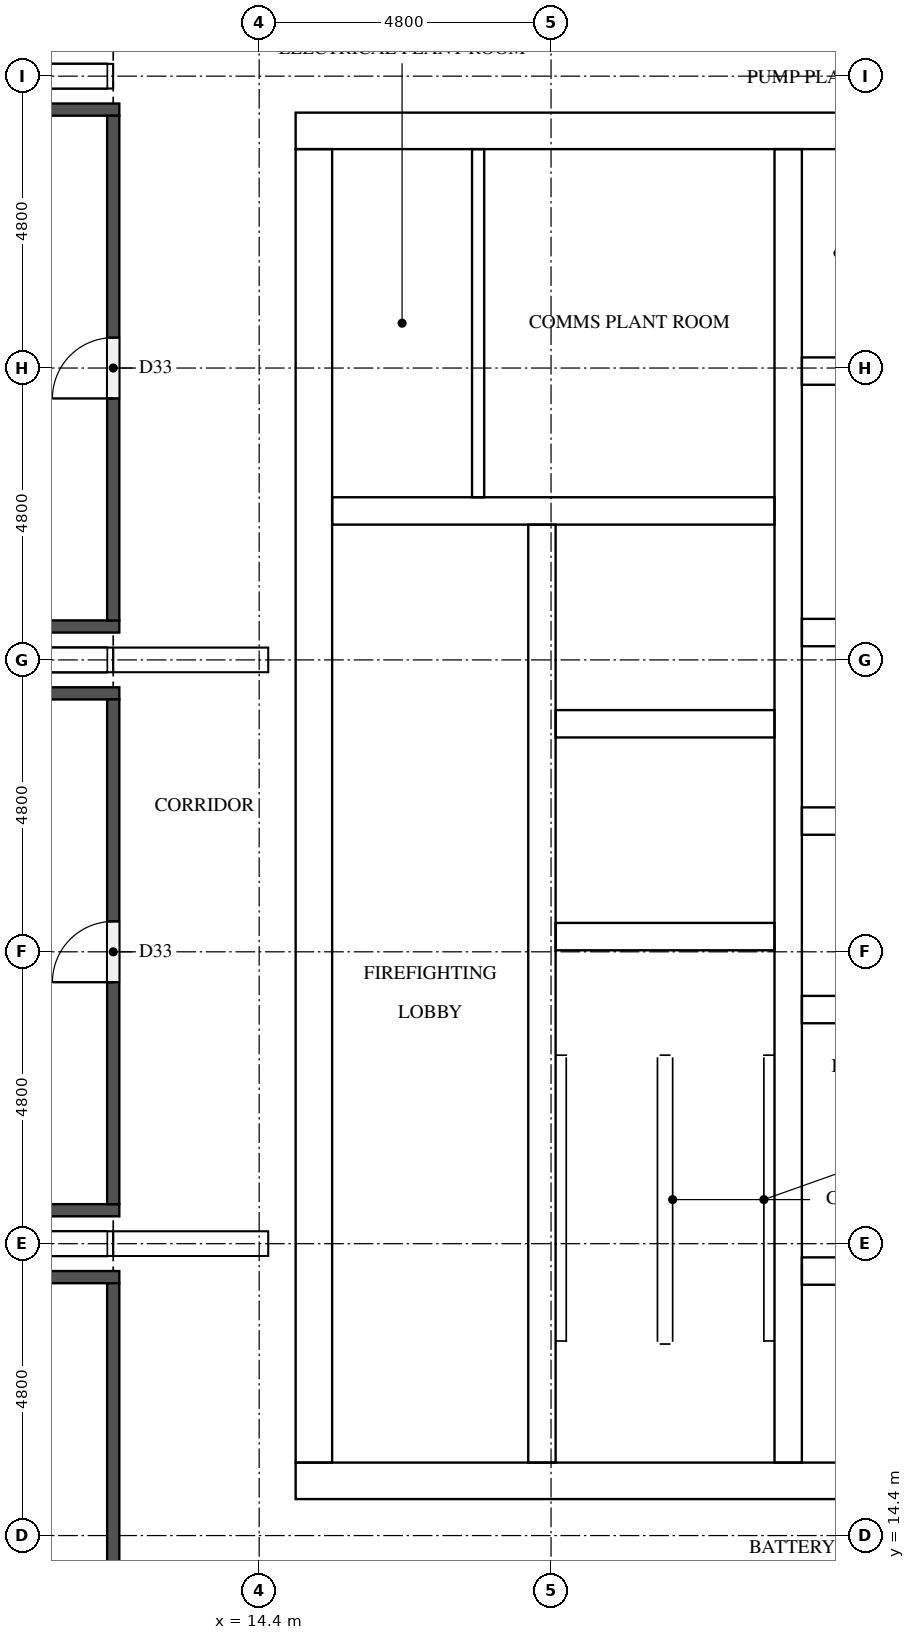
"""IFC4 building model, lengths in metres.
Left out: names, types, materials, properties, quantities, classifications, styles, units other than length and angle.
Written with IfcOpenShell. Run it as: python <this file> out.ifc"""

import sys

from ifc_helpers import new_model, si_unit, direction, frame, frame_2d, origin, place, context, subcontext, project, spatial, rectangle, extrude, element, fill, save


model = new_model("IFC4")
c1 = context("Model", 3, precision=1e-05, world=origin(), true_north=direction((0.0, 1.0)))
c2 = subcontext(c1, "Body", "Model", "MODEL_VIEW")
j1 = project(units=[si_unit("LENGTHUNIT", "METRE"), si_unit("PLANEANGLEUNIT", "RADIAN")], contexts=[c1])
p1 = place(None, origin())
s1 = spatial("IfcSite", under=j1, at=p1, CompositionType="ELEMENT")
p2 = place(p1, origin())
s2 = spatial("IfcBuilding", under=s1, at=p2, CompositionType="ELEMENT")
p3 = place(p2, frame((0.0, 0.0, 233.3)))
s3 = spatial("IfcBuildingStorey", under=s2, at=p3, CompositionType="ELEMENT", Elevation=233.3)
p4 = place(p3, frame((15.0, 15.3, 0.0), z_axis=(0.0, 0.0, 1.0), x_axis=(1.0, 0.0, 0.0)))
e1 = element("IfcWall", 1, at=p4, inside=s3, PredefinedType="SHEAR", context=c2, shape_type="SweptSolid", body=[
    extrude(rectangle(XDim=32.4, YDim=0.6, at=frame_2d((16.2, 0.0))), origin(), (0.0, 0.0, 1.0), 5.1),
])
p5 = place(p4, frame((15.3, 0.0, 0.0)))
e2 = element("IfcOpeningElement", 2, at=p5, cuts=e1, PredefinedType="OPENING", context=c2, shape_type="SweptSolid", body=[
    extrude(rectangle(XDim=1.8, YDim=2.1, at=frame_2d((0.9, 1.05))), frame((0.0, 0.31, 0.0), z_axis=(0.0, -1.0, 0.0), x_axis=(1.0, 0.0, 0.0)), (0.0, 0.0, 1.0), 0.62),
])
p6 = place(p3, frame((15.0, 37.5, 0.0), z_axis=(0.0, 0.0, 1.0), x_axis=(1.0, 0.0, 0.0)))
e3 = element("IfcWall", 3, at=p6, inside=s3, PredefinedType="SHEAR", context=c2, shape_type="SweptSolid", body=[
    extrude(rectangle(XDim=32.4, YDim=0.6, at=frame_2d((16.2, 0.0))), origin(), (0.0, 0.0, 1.0), 5.1),
])
p7 = place(p6, frame((15.3, 0.0, 0.0)))
e4 = element("IfcOpeningElement", 4, at=p7, cuts=e3, PredefinedType="OPENING", context=c2, shape_type="SweptSolid", body=[
    extrude(rectangle(XDim=1.8, YDim=2.1, at=frame_2d((0.9, 1.05))), frame((0.0, 0.31, 0.0), z_axis=(0.0, -1.0, 0.0), x_axis=(1.0, 0.0, 0.0)), (0.0, 0.0, 1.0), 0.62),
])
p8 = place(p6, frame((1.25, 0.0, 0.0)))
e5 = element("IfcOpeningElement", 5, at=p8, cuts=e3, PredefinedType="OPENING", context=c2, shape_type="SweptSolid", body=[
    extrude(rectangle(XDim=1.0, YDim=2.1, at=frame_2d((0.5, 1.05))), frame((0.0, 0.31, 0.0), z_axis=(0.0, -1.0, 0.0), x_axis=(1.0, 0.0, 0.0)), (0.0, 0.0, 1.0), 0.62),
])
p9 = place(p6, frame((4.988, 0.0, 0.0)))
e6 = element("IfcOpeningElement", 6, at=p9, cuts=e3, PredefinedType="OPENING", context=c2, shape_type="SweptSolid", body=[
    extrude(rectangle(XDim=1.0, YDim=2.1, at=frame_2d((0.5, 1.05))), frame((0.0, 0.31, 0.0), z_axis=(0.0, -1.0, 0.0), x_axis=(1.0, 0.0, 0.0)), (0.0, 0.0, 1.0), 0.62),
])
p10 = place(p3, frame((15.3, 15.6, 0.0), z_axis=(0.0, 0.0, 1.0), x_axis=(0.0, 1.0, 0.0)))
e7 = element("IfcWall", 7, at=p10, inside=s3, PredefinedType="SHEAR", context=c2, shape_type="SweptSolid", body=[
    extrude(rectangle(XDim=21.6, YDim=0.6, at=frame_2d((10.8, 0.0))), origin(), (0.0, 0.0, 1.0), 5.1),
])
p11 = place(p10, frame((5.16, 0.0, 0.0)))
e8 = element("IfcOpeningElement", 8, at=p11, cuts=e7, PredefinedType="OPENING", context=c2, shape_type="SweptSolid", body=[
    extrude(rectangle(XDim=1.2, YDim=2.1, at=frame_2d((0.6, 1.05))), frame((0.0, 0.31, 0.0), z_axis=(0.0, -1.0, 0.0), x_axis=(1.0, 0.0, 0.0)), (0.0, 0.0, 1.0), 0.62),
])
p12 = place(p3, frame((19.05, 15.6, 0.0), z_axis=(0.0, 0.0, 1.0), x_axis=(0.0, 1.0, 0.0)))
e9 = element("IfcWall", 9, at=p12, inside=s3, PredefinedType="SHEAR", context=c2, shape_type="SweptSolid", body=[
    extrude(rectangle(XDim=15.425, YDim=0.45, at=frame_2d((7.712, 0.0))), origin(), (0.0, 0.0, 1.0), 5.1),
])
p13 = place(p12, frame((9.85, 0.0, 0.0)))
e10 = element("IfcOpeningElement", 10, at=p13, cuts=e9, PredefinedType="OPENING", context=c2, shape_type="SweptSolid", body=[
    extrude(rectangle(XDim=1.1, YDim=2.1, at=frame_2d((0.55, 1.05))), frame((0.0, 0.235, 0.0), z_axis=(0.0, -1.0, 0.0), x_axis=(1.0, 0.0, 0.0)), (0.0, 0.0, 1.0), 0.47),
])
p14 = place(p12, frame((13.35, 0.0, 0.0)))
e11 = element("IfcOpeningElement", 11, at=p14, cuts=e9, PredefinedType="OPENING", context=c2, shape_type="SweptSolid", body=[
    extrude(rectangle(XDim=1.1, YDim=2.1, at=frame_2d((0.55, 1.05))), frame((0.0, 0.235, 0.0), z_axis=(0.0, -1.0, 0.0), x_axis=(1.0, 0.0, 0.0)), (0.0, 0.0, 1.0), 0.47),
])
p15 = place(p12, frame((0.6, 0.0, 0.0)))
e12 = element("IfcOpeningElement", 12, at=p15, cuts=e9, PredefinedType="OPENING", context=c2, shape_type="SweptSolid", body=[
    extrude(rectangle(XDim=1.2, YDim=2.1, at=frame_2d((0.6, 1.05))), frame((0.0, 0.235, 0.0), z_axis=(0.0, -1.0, 0.0), x_axis=(1.0, 0.0, 0.0)), (0.0, 0.0, 1.0), 0.47),
])
p16 = place(p3, frame((23.1, 15.6, 0.0), z_axis=(0.0, 0.0, 1.0), x_axis=(0.0, 1.0, 0.0)))
e13 = element("IfcWall", 13, at=p16, inside=s3, PredefinedType="SHEAR", context=c2, shape_type="SweptSolid", body=[
    extrude(rectangle(XDim=21.6, YDim=0.45, at=frame_2d((10.8, 0.0))), origin(), (0.0, 0.0, 1.0), 5.1),
])
for number, where, z_axis, x_axis in (
    (14, (19.275, 24.25, 0.0), (0.0, 0.0, 1.0), (1.0, 0.0, 0.0)),
    (15, (19.275, 27.75, 0.0), (0.0, 0.0, 1.0), (1.0, 0.0, 0.0)),
):
    element("IfcWall", number, at=place(p3, frame(where, z_axis=z_axis, x_axis=x_axis)), inside=s3, PredefinedType="SHEAR", context=c2, shape_type="SweptSolid", body=[
        extrude(rectangle(XDim=3.6, YDim=0.45, at=frame_2d((1.8, 0.0))), origin(), (0.0, 0.0, 1.0), 5.1),
    ])
p17 = place(p3, frame((15.6, 31.25, 0.0), z_axis=(0.0, 0.0, 1.0), x_axis=(1.0, 0.0, 0.0)))
e16 = element("IfcWall", 16, at=p17, inside=s3, PredefinedType="SHEAR", context=c2, shape_type="SweptSolid", body=[
    extrude(rectangle(XDim=7.275, YDim=0.45, at=frame_2d((3.637, 0.0))), origin(), (0.0, 0.0, 1.0), 5.1),
])
p18 = place(p3, frame((23.325, 18.75, 0.0), z_axis=(0.0, 0.0, 1.0), x_axis=(1.0, 0.0, 0.0)))
e17 = element("IfcWall", 17, at=p18, inside=s3, PredefinedType="SHEAR", context=c2, shape_type="SweptSolid", body=[
    extrude(rectangle(XDim=5.6, YDim=0.45, at=frame_2d((2.8, 0.0))), origin(), (0.0, 0.0, 1.0), 5.1),
])
p19 = place(p18, frame((0.403, 0.0, 0.0)))
e18 = element("IfcOpeningElement", 18, at=p19, cuts=e17, PredefinedType="OPENING", context=c2, shape_type="SweptSolid", body=[
    extrude(rectangle(XDim=1.0, YDim=2.1, at=frame_2d((0.5, 1.05))), frame((0.0, 0.235, 0.0), z_axis=(0.0, -1.0, 0.0), x_axis=(1.0, 0.0, 0.0)), (0.0, 0.0, 1.0), 0.47),
])
p20 = place(p18, frame((3.078, 0.0, 0.0)))
e19 = element("IfcOpeningElement", 19, at=p20, cuts=e17, PredefinedType="OPENING", context=c2, shape_type="SweptSolid", body=[
    extrude(rectangle(XDim=1.0, YDim=2.1, at=frame_2d((0.5, 1.05))), frame((0.0, 0.235, 0.0), z_axis=(0.0, -1.0, 0.0), x_axis=(1.0, 0.0, 0.0)), (0.0, 0.0, 1.0), 0.47),
])
p21 = place(p3, frame((23.325, 23.05, 0.0), z_axis=(0.0, 0.0, 1.0), x_axis=(1.0, 0.0, 0.0)))
e20 = element("IfcWall", 20, at=p21, inside=s3, PredefinedType="SHEAR", context=c2, shape_type="SweptSolid", body=[
    extrude(rectangle(XDim=15.75, YDim=0.45, at=frame_2d((7.875, 0.0))), origin(), (0.0, 0.0, 1.0), 5.1),
])
p22 = place(p21, frame((0.32, 0.0, 0.0)))
e21 = element("IfcOpeningElement", 21, at=p22, cuts=e20, PredefinedType="OPENING", context=c2, shape_type="SweptSolid", body=[
    extrude(rectangle(XDim=1.0, YDim=2.1, at=frame_2d((0.5, 1.05))), frame((0.0, 0.235, 0.0), z_axis=(0.0, -1.0, 0.0), x_axis=(1.0, 0.0, 0.0)), (0.0, 0.0, 1.0), 0.47),
])
p23 = place(p21, frame((2.978, 0.0, 0.0)))
e22 = element("IfcOpeningElement", 22, at=p23, cuts=e20, PredefinedType="OPENING", context=c2, shape_type="SweptSolid", body=[
    extrude(rectangle(XDim=1.0, YDim=2.1, at=frame_2d((0.5, 1.05))), frame((0.0, 0.235, 0.0), z_axis=(0.0, -1.0, 0.0), x_axis=(1.0, 0.0, 0.0)), (0.0, 0.0, 1.0), 0.47),
])
p24 = place(p21, frame((10.953, 0.0, 0.0)))
e23 = element("IfcOpeningElement", 23, at=p24, cuts=e20, PredefinedType="OPENING", context=c2, shape_type="SweptSolid", body=[
    extrude(rectangle(XDim=1.0, YDim=2.1, at=frame_2d((0.5, 1.05))), frame((0.0, 0.235, 0.0), z_axis=(0.0, -1.0, 0.0), x_axis=(1.0, 0.0, 0.0)), (0.0, 0.0, 1.0), 0.47),
])
p25 = place(p21, frame((13.612, 0.0, 0.0)))
e24 = element("IfcOpeningElement", 24, at=p25, cuts=e20, PredefinedType="OPENING", context=c2, shape_type="SweptSolid", body=[
    extrude(rectangle(XDim=1.0, YDim=2.1, at=frame_2d((0.5, 1.05))), frame((0.0, 0.235, 0.0), z_axis=(0.0, -1.0, 0.0), x_axis=(1.0, 0.0, 0.0)), (0.0, 0.0, 1.0), 0.47),
])
p26 = place(p3, frame((23.325, 26.15, 0.0), z_axis=(0.0, 0.0, 1.0), x_axis=(1.0, 0.0, 0.0)))
e25 = element("IfcWall", 25, at=p26, inside=s3, PredefinedType="SHEAR", context=c2, shape_type="SweptSolid", body=[
    extrude(rectangle(XDim=15.75, YDim=0.45, at=frame_2d((7.875, 0.0))), origin(), (0.0, 0.0, 1.0), 5.1),
])
p27 = place(p3, frame((23.325, 29.25, 0.0), z_axis=(0.0, 0.0, 1.0), x_axis=(1.0, 0.0, 0.0)))
e26 = element("IfcWall", 26, at=p27, inside=s3, PredefinedType="SHEAR", context=c2, shape_type="SweptSolid", body=[
    extrude(rectangle(XDim=15.75, YDim=0.45, at=frame_2d((7.875, 0.0))), origin(), (0.0, 0.0, 1.0), 5.1),
])
p28 = place(p27, frame((0.679, 0.0, 0.0)))
e27 = element("IfcOpeningElement", 27, at=p28, cuts=e26, PredefinedType="OPENING", context=c2, shape_type="SweptSolid", body=[
    extrude(rectangle(XDim=1.1, YDim=2.1, at=frame_2d((0.55, 1.05))), frame((0.0, 0.235, 0.0), z_axis=(0.0, -1.0, 0.0), x_axis=(1.0, 0.0, 0.0)), (0.0, 0.0, 1.0), 0.47),
])
p29 = place(p27, frame((3.337, 0.0, 0.0)))
e28 = element("IfcOpeningElement", 28, at=p29, cuts=e26, PredefinedType="OPENING", context=c2, shape_type="SweptSolid", body=[
    extrude(rectangle(XDim=1.1, YDim=2.1, at=frame_2d((0.55, 1.05))), frame((0.0, 0.235, 0.0), z_axis=(0.0, -1.0, 0.0), x_axis=(1.0, 0.0, 0.0)), (0.0, 0.0, 1.0), 0.47),
])
p30 = place(p27, frame((5.996, 0.0, 0.0)))
e29 = element("IfcOpeningElement", 29, at=p30, cuts=e26, PredefinedType="OPENING", context=c2, shape_type="SweptSolid", body=[
    extrude(rectangle(XDim=1.1, YDim=2.1, at=frame_2d((0.55, 1.05))), frame((0.0, 0.235, 0.0), z_axis=(0.0, -1.0, 0.0), x_axis=(1.0, 0.0, 0.0)), (0.0, 0.0, 1.0), 0.47),
])
p31 = place(p27, frame((8.654, 0.0, 0.0)))
e30 = element("IfcOpeningElement", 30, at=p31, cuts=e26, PredefinedType="OPENING", context=c2, shape_type="SweptSolid", body=[
    extrude(rectangle(XDim=1.1, YDim=2.1, at=frame_2d((0.55, 1.05))), frame((0.0, 0.235, 0.0), z_axis=(0.0, -1.0, 0.0), x_axis=(1.0, 0.0, 0.0)), (0.0, 0.0, 1.0), 0.47),
])
p32 = place(p27, frame((11.312, 0.0, 0.0)))
e31 = element("IfcOpeningElement", 31, at=p32, cuts=e26, PredefinedType="OPENING", context=c2, shape_type="SweptSolid", body=[
    extrude(rectangle(XDim=1.1, YDim=2.1, at=frame_2d((0.55, 1.05))), frame((0.0, 0.235, 0.0), z_axis=(0.0, -1.0, 0.0), x_axis=(1.0, 0.0, 0.0)), (0.0, 0.0, 1.0), 0.47),
])
p33 = place(p27, frame((13.971, 0.0, 0.0)))
e32 = element("IfcOpeningElement", 32, at=p33, cuts=e26, PredefinedType="OPENING", context=c2, shape_type="SweptSolid", body=[
    extrude(rectangle(XDim=1.1, YDim=2.1, at=frame_2d((0.55, 1.05))), frame((0.0, 0.235, 0.0), z_axis=(0.0, -1.0, 0.0), x_axis=(1.0, 0.0, 0.0)), (0.0, 0.0, 1.0), 0.47),
])
p34 = place(p3, frame((23.325, 33.55, 0.0), z_axis=(0.0, 0.0, 1.0), x_axis=(1.0, 0.0, 0.0)))
e33 = element("IfcWall", 33, at=p34, inside=s3, PredefinedType="SHEAR", context=c2, shape_type="SweptSolid", body=[
    extrude(rectangle(XDim=5.6, YDim=0.45, at=frame_2d((2.8, 0.0))), origin(), (0.0, 0.0, 1.0), 5.1),
])
p35 = place(p34, frame((0.094, 0.0, 0.0)))
e34 = element("IfcOpeningElement", 34, at=p35, cuts=e33, PredefinedType="OPENING", context=c2, shape_type="SweptSolid", body=[
    extrude(rectangle(XDim=1.0, YDim=2.1, at=frame_2d((0.5, 1.05))), frame((0.0, 0.235, 0.0), z_axis=(0.0, -1.0, 0.0), x_axis=(1.0, 0.0, 0.0)), (0.0, 0.0, 1.0), 0.47),
])
p36 = place(p34, frame((2.769, 0.0, 0.0)))
e35 = element("IfcOpeningElement", 35, at=p36, cuts=e33, PredefinedType="OPENING", context=c2, shape_type="SweptSolid", body=[
    extrude(rectangle(XDim=1.0, YDim=2.1, at=frame_2d((0.5, 1.05))), frame((0.0, 0.235, 0.0), z_axis=(0.0, -1.0, 0.0), x_axis=(1.0, 0.0, 0.0)), (0.0, 0.0, 1.0), 0.47),
])
p37 = place(p3, frame((18.001, 31.475, 0.0), z_axis=(0.0, 0.0, 1.0), x_axis=(0.0, 1.0, 0.0)))
e36 = element("IfcWall", 36, at=p37, inside=s3, PredefinedType="PARTITIONING", context=c2, shape_type="SweptSolid", body=[
    extrude(rectangle(XDim=5.725, YDim=0.2, at=frame_2d((2.862, 0.0))), origin(), (0.0, 0.0, 1.0), 5.1),
])
for number, where, z_axis, x_axis in (
    (37, (2.3, 18.65, 0.0), (0.0, 0.0, 1.0), (1.0, 0.0, 0.0)),
    (38, (2.3, 19.75, 0.0), (0.0, 0.0, 1.0), (1.0, 0.0, 0.0)),
    (39, (2.3, 28.25, 0.0), (0.0, 0.0, 1.0), (1.0, 0.0, 0.0)),
    (40, (2.3, 29.35, 0.0), (0.0, 0.0, 1.0), (1.0, 0.0, 0.0)),
    (41, (2.3, 37.85, 0.0), (0.0, 0.0, 1.0), (1.0, 0.0, 0.0)),
):
    element("IfcWall", number, at=place(p3, frame(where, z_axis=z_axis, x_axis=x_axis)), inside=s3, PredefinedType="PARTITIONING", context=c2, shape_type="SweptSolid", body=[
        extrude(rectangle(XDim=9.8, YDim=0.2, at=frame_2d((4.9, 0.0))), origin(), (0.0, 0.0, 1.0), 5.1),
    ])
p38 = place(p3, frame((12.0, 12.1, 0.0), z_axis=(0.0, 0.0, 1.0), x_axis=(0.0, 1.0, 0.0)))
e42 = element("IfcWall", 42, at=p38, inside=s3, PredefinedType="PARTITIONING", context=c2, shape_type="SweptSolid", body=[
    extrude(rectangle(XDim=6.45, YDim=0.2, at=frame_2d((3.225, 0.0))), origin(), (0.0, 0.0, 1.0), 5.1),
])
p39 = place(p3, frame((12.0, 19.85, 0.0), z_axis=(0.0, 0.0, 1.0), x_axis=(0.0, 1.0, 0.0)))
e43 = element("IfcWall", 43, at=p39, inside=s3, PredefinedType="PARTITIONING", context=c2, shape_type="SweptSolid", body=[
    extrude(rectangle(XDim=8.3, YDim=0.2, at=frame_2d((4.15, 0.0))), origin(), (0.0, 0.0, 1.0), 5.1),
])
p40 = place(p39, frame((3.65, 0.0, 0.0)))
e44 = element("IfcOpeningElement", 44, at=p40, cuts=e43, PredefinedType="OPENING", context=c2, shape_type="SweptSolid", body=[
    extrude(rectangle(XDim=1.0, YDim=2.1, at=frame_2d((0.5, 1.05))), frame((0.0, 0.11, 0.0), z_axis=(0.0, -1.0, 0.0), x_axis=(1.0, 0.0, 0.0)), (0.0, 0.0, 1.0), 0.22),
])
p41 = place(p3, frame((12.0, 29.45, 0.0), z_axis=(0.0, 0.0, 1.0), x_axis=(0.0, 1.0, 0.0)))
e45 = element("IfcWall", 45, at=p41, inside=s3, PredefinedType="PARTITIONING", context=c2, shape_type="SweptSolid", body=[
    extrude(rectangle(XDim=8.3, YDim=0.2, at=frame_2d((4.15, 0.0))), origin(), (0.0, 0.0, 1.0), 5.1),
])
p42 = place(p41, frame((3.65, 0.0, 0.0)))
e46 = element("IfcOpeningElement", 46, at=p42, cuts=e45, PredefinedType="OPENING", context=c2, shape_type="SweptSolid", body=[
    extrude(rectangle(XDim=1.0, YDim=2.1, at=frame_2d((0.5, 1.05))), frame((0.0, 0.11, 0.0), z_axis=(0.0, -1.0, 0.0), x_axis=(1.0, 0.0, 0.0)), (0.0, 0.0, 1.0), 0.22),
])
p43 = place(p13, origin())
e47 = element("IfcDoor", 47, at=p43, inside=s3, OperationType="DOUBLE_DOOR_SLIDING", PredefinedType="DOOR", context=c2, shape_type="SweptSolid", body=[
    extrude(rectangle(XDim=1.1, YDim=2.1, at=frame_2d((0.55, 1.05))), frame((0.0, 0.025, 0.0), z_axis=(0.0, -1.0, 0.0), x_axis=(1.0, 0.0, 0.0)), (0.0, 0.0, 1.0), 0.05),
])
fill(e10, e47)
p44 = place(p14, origin())
e48 = element("IfcDoor", 48, at=p44, inside=s3, OperationType="DOUBLE_DOOR_SLIDING", PredefinedType="DOOR", context=c2, shape_type="SweptSolid", body=[
    extrude(rectangle(XDim=1.1, YDim=2.1, at=frame_2d((0.55, 1.05))), frame((0.0, 0.025, 0.0), z_axis=(0.0, -1.0, 0.0), x_axis=(1.0, 0.0, 0.0)), (0.0, 0.0, 1.0), 0.05),
])
fill(e11, e48)
p45 = place(p15, frame((1.2, 0.0, 0.0), z_axis=(0.0, 0.0, 1.0), x_axis=(-1.0, 0.0, 0.0)))
e49 = element("IfcDoor", 49, at=p45, inside=s3, OperationType="SINGLE_SWING_LEFT", PredefinedType="DOOR", context=c2, shape_type="SweptSolid", body=[
    extrude(rectangle(XDim=1.2, YDim=2.1, at=frame_2d((0.6, 1.05))), frame((0.0, 0.025, 0.0), z_axis=(0.0, -1.0, 0.0), x_axis=(1.0, 0.0, 0.0)), (0.0, 0.0, 1.0), 0.05),
])
fill(e12, e49)
p46 = place(p11, frame((1.2, 0.0, 0.0), z_axis=(0.0, 0.0, 1.0), x_axis=(-1.0, 0.0, 0.0)))
e50 = element("IfcDoor", 50, at=p46, inside=s3, OperationType="SINGLE_SWING_RIGHT", PredefinedType="DOOR", context=c2, shape_type="SweptSolid", body=[
    extrude(rectangle(XDim=1.2, YDim=2.1, at=frame_2d((0.6, 1.05))), frame((0.0, 0.025, 0.0), z_axis=(0.0, -1.0, 0.0), x_axis=(1.0, 0.0, 0.0)), (0.0, 0.0, 1.0), 0.05),
])
fill(e8, e50)
p47 = place(p8, origin())
e51 = element("IfcDoor", 51, at=p47, inside=s3, OperationType="SINGLE_SWING_RIGHT", PredefinedType="DOOR", context=c2, shape_type="SweptSolid", body=[
    extrude(rectangle(XDim=1.0, YDim=2.1, at=frame_2d((0.5, 1.05))), frame((0.0, 0.025, 0.0), z_axis=(0.0, -1.0, 0.0), x_axis=(1.0, 0.0, 0.0)), (0.0, 0.0, 1.0), 0.05),
])
fill(e5, e51)
p48 = place(p9, origin())
e52 = element("IfcDoor", 52, at=p48, inside=s3, OperationType="SINGLE_SWING_LEFT", PredefinedType="DOOR", context=c2, shape_type="SweptSolid", body=[
    extrude(rectangle(XDim=1.0, YDim=2.1, at=frame_2d((0.5, 1.05))), frame((0.0, 0.025, 0.0), z_axis=(0.0, -1.0, 0.0), x_axis=(1.0, 0.0, 0.0)), (0.0, 0.0, 1.0), 0.05),
])
fill(e6, e52)
p49 = place(p22, frame((1.0, 0.0, 0.0), z_axis=(0.0, 0.0, 1.0), x_axis=(-1.0, 0.0, 0.0)))
e53 = element("IfcDoor", 53, at=p49, inside=s3, OperationType="SINGLE_SWING_RIGHT", PredefinedType="DOOR", context=c2, shape_type="SweptSolid", body=[
    extrude(rectangle(XDim=1.0, YDim=2.1, at=frame_2d((0.5, 1.05))), frame((0.0, 0.025, 0.0), z_axis=(0.0, -1.0, 0.0), x_axis=(1.0, 0.0, 0.0)), (0.0, 0.0, 1.0), 0.05),
])
fill(e21, e53)
p50 = place(p19, origin())
e54 = element("IfcDoor", 54, at=p50, inside=s3, OperationType="SINGLE_SWING_RIGHT", PredefinedType="DOOR", context=c2, shape_type="SweptSolid", body=[
    extrude(rectangle(XDim=1.0, YDim=2.1, at=frame_2d((0.5, 1.05))), frame((0.0, 0.025, 0.0), z_axis=(0.0, -1.0, 0.0), x_axis=(1.0, 0.0, 0.0)), (0.0, 0.0, 1.0), 0.05),
])
fill(e18, e54)
p51 = place(p35, frame((1.0, 0.0, 0.0), z_axis=(0.0, 0.0, 1.0), x_axis=(-1.0, 0.0, 0.0)))
e55 = element("IfcDoor", 55, at=p51, inside=s3, OperationType="SINGLE_SWING_RIGHT", PredefinedType="DOOR", context=c2, shape_type="SweptSolid", body=[
    extrude(rectangle(XDim=1.0, YDim=2.1, at=frame_2d((0.5, 1.05))), frame((0.0, 0.025, 0.0), z_axis=(0.0, -1.0, 0.0), x_axis=(1.0, 0.0, 0.0)), (0.0, 0.0, 1.0), 0.05),
])
fill(e34, e55)
p52 = place(p40, origin())
e56 = element("IfcDoor", 56, at=p52, inside=s3, OperationType="SINGLE_SWING_LEFT", PredefinedType="DOOR", context=c2, shape_type="SweptSolid", body=[
    extrude(rectangle(XDim=1.0, YDim=2.1, at=frame_2d((0.5, 1.05))), frame((0.0, 0.025, 0.0), z_axis=(0.0, -1.0, 0.0), x_axis=(1.0, 0.0, 0.0)), (0.0, 0.0, 1.0), 0.05),
])
fill(e44, e56)
p53 = place(p42, origin())
e57 = element("IfcDoor", 57, at=p53, inside=s3, OperationType="SINGLE_SWING_LEFT", PredefinedType="DOOR", context=c2, shape_type="SweptSolid", body=[
    extrude(rectangle(XDim=1.0, YDim=2.1, at=frame_2d((0.5, 1.05))), frame((0.0, 0.025, 0.0), z_axis=(0.0, -1.0, 0.0), x_axis=(1.0, 0.0, 0.0)), (0.0, 0.0, 1.0), 0.05),
])
fill(e46, e57)
save(model, sys.argv[1])
